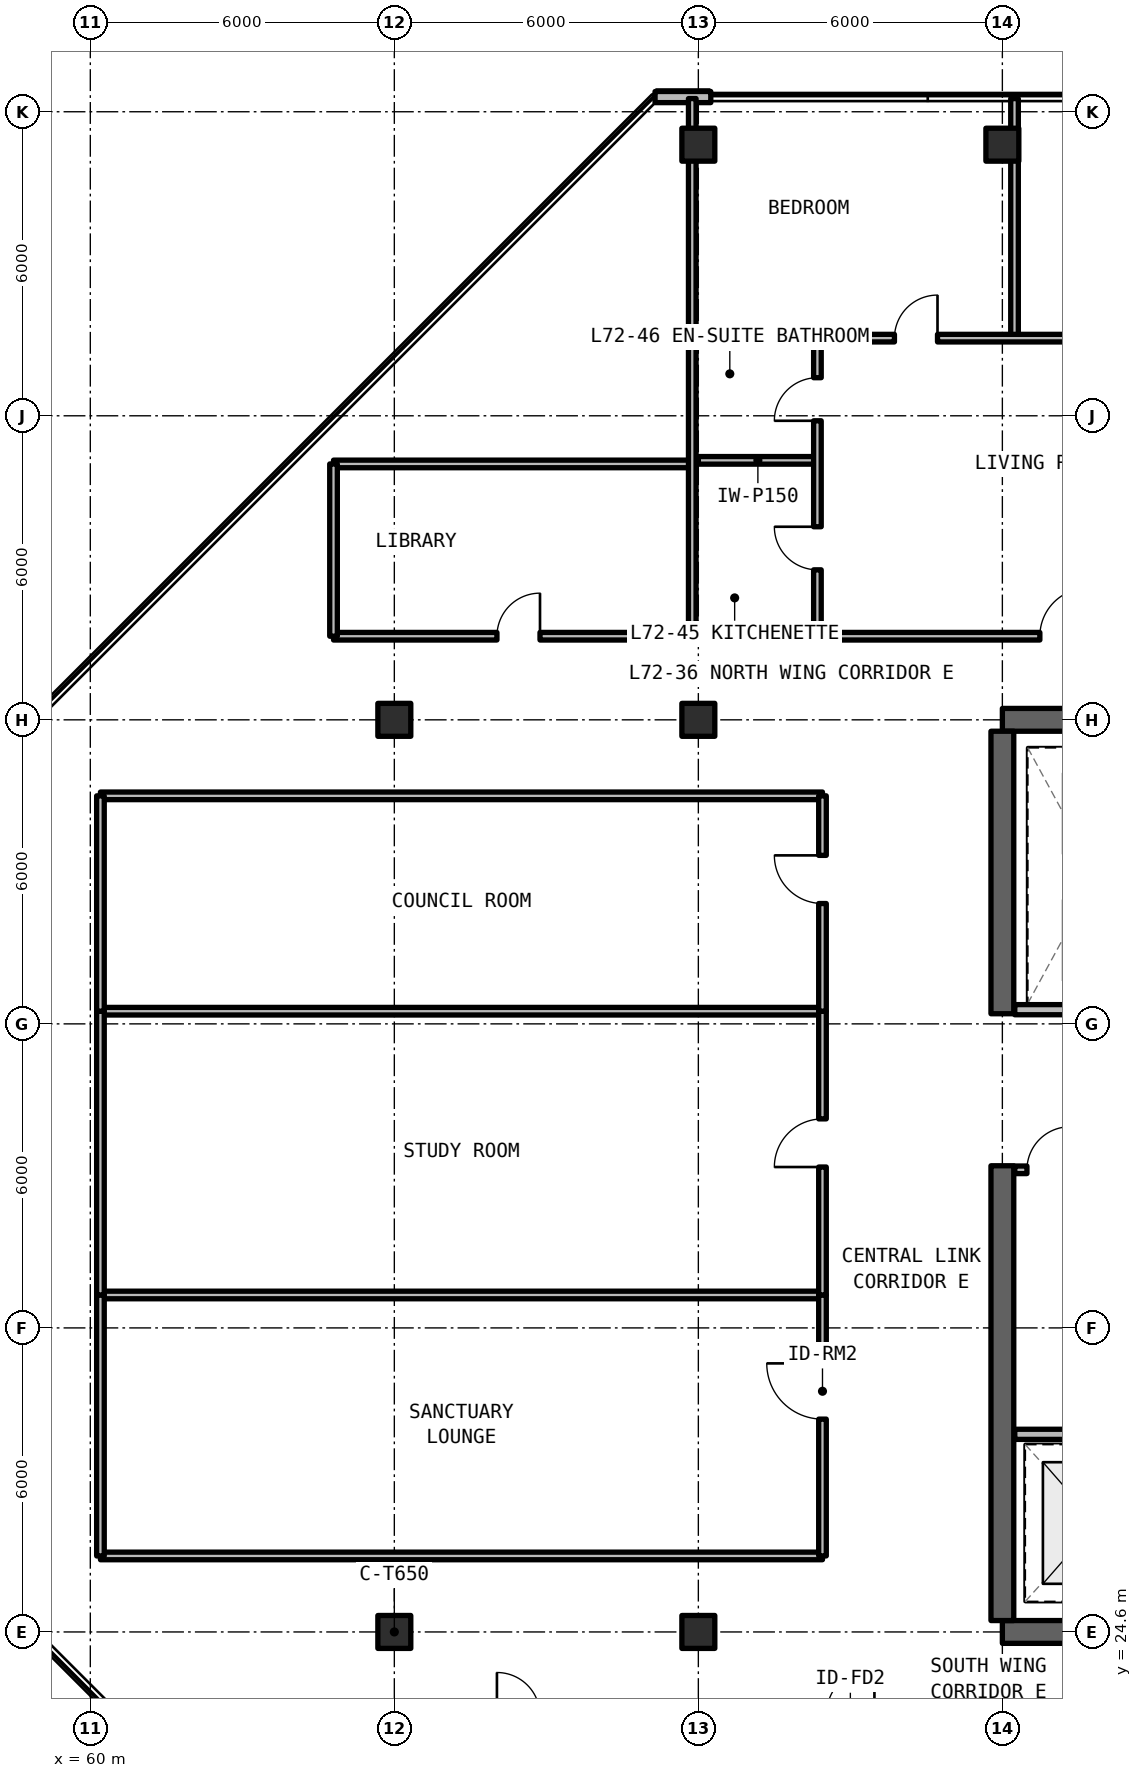
"""IFC4 building model, lengths in metres.
Left out: names, types, materials, properties, quantities, classifications, styles, units other than length and angle.
Written with IfcOpenShell. Run it as: python <this file> out.ifc"""

import sys

from ifc_helpers import new_model, si_unit, direction, frame, frame_2d, origin, origin_2d, place, context, subcontext, project, spatial, rectangle, extrude, element, fill, save


model = new_model("IFC4")
c1 = context("Model", 3, precision=1e-05, world=origin(), true_north=direction((0.0, 1.0)))
c2 = subcontext(c1, "Body", "Model", "MODEL_VIEW")
j1 = project(units=[si_unit("LENGTHUNIT", "METRE"), si_unit("PLANEANGLEUNIT", "RADIAN")], contexts=[c1])
p1 = place(None, origin())
s1 = spatial("IfcSite", under=j1, at=p1, CompositionType="ELEMENT")
p2 = place(p1, origin())
s2 = spatial("IfcBuilding", under=s1, at=p2, CompositionType="ELEMENT")
p3 = place(p2, frame((0.0, 0.0, 257.07)))
s3 = spatial("IfcBuildingStorey", under=s2, at=p3, CompositionType="ELEMENT", Elevation=257.07)
for number, where, z_axis, x_axis in (
    (1, (78.0, 24.6, 0.0), (0.0, 0.0, 1.0), (1.0, 0.0, 0.0)),
    (2, (90.0, 42.6, 0.0), (0.0, 0.0, 1.0), (-1.0, 0.0, 0.0)),
):
    element("IfcWall", number, at=place(p3, frame(where, z_axis=z_axis, x_axis=x_axis)), inside=s3, PredefinedType="SHEAR", context=c2, shape_type="SweptSolid", body=[
        extrude(rectangle(XDim=12.0, YDim=0.45, at=frame_2d((6.0, 0.0))), origin(), (0.0, 0.0, 1.0), 3.63),
    ])
p4 = place(p3, frame((78.0, 24.825, 0.0), z_axis=(0.0, 0.0, 1.0), x_axis=(0.0, 1.0, 0.0)))
e3 = element("IfcWall", 3, at=p4, inside=s3, PredefinedType="SHEAR", context=c2, shape_type="SweptSolid", body=[
    extrude(rectangle(XDim=8.975, YDim=0.45, at=frame_2d((4.488, 0.0))), origin(), (0.0, 0.0, 1.0), 3.63),
])
p5 = place(p3, frame((78.0, 36.8, 0.0), z_axis=(0.0, 0.0, 1.0), x_axis=(0.0, 1.0, 0.0)))
e4 = element("IfcWall", 4, at=p5, inside=s3, PredefinedType="SHEAR", context=c2, shape_type="SweptSolid", body=[
    extrude(rectangle(XDim=5.575, YDim=0.45, at=frame_2d((2.788, 0.0))), origin(), (0.0, 0.0, 1.0), 3.63),
])
for number, where, z_axis, x_axis in (
    (5, (66.0, 24.6, 0.0), (0.0, 0.0, 1.0), (1.0, 0.0, 0.0)),
    (6, (66.0, 42.6, 0.0), (0.0, 0.0, 1.0), (1.0, 0.0, 0.0)),
    (7, (72.0, 24.6, 0.0), (0.0, 0.0, 1.0), (1.0, 0.0, 0.0)),
    (8, (72.0, 42.6, 0.0), (0.0, 0.0, 1.0), (1.0, 0.0, 0.0)),
    (9, (72.0, 53.95, 0.0), (0.0, 0.0, 1.0), (1.0, 0.0, 0.0)),
    (10, (78.0, 53.95, 0.0), (0.0, 0.0, 1.0), (1.0, 0.0, 0.0)),
):
    element("IfcColumn", number, at=place(p3, frame(where, z_axis=z_axis, x_axis=x_axis)), inside=s3, PredefinedType="COLUMN", context=c2, shape_type="SweptSolid", body=[
        extrude(rectangle(XDim=0.65, YDim=0.65, at=origin_2d()), origin(), (0.0, 0.0, 1.0), 3.63),
    ])
p6 = place(p3, frame((72.246, 54.89, 0.0), z_axis=(0.0, 0.0, 1.0), x_axis=(-1.0, 0.0, 0.0)))
e11 = element("IfcWall", 11, at=p6, inside=s3, PredefinedType="SOLIDWALL", context=c2, shape_type="SweptSolid", body=[
    extrude(rectangle(XDim=1.1, YDim=0.22, at=frame_2d((0.55, 0.0))), origin(), (0.0, 0.0, 1.0), 3.41),
])
p7 = place(p3, frame((78.245, 28.5, 0.0), z_axis=(0.0, 0.0, 1.0), x_axis=(1.0, 0.0, 0.0)))
e12 = element("IfcWall", 12, at=p7, inside=s3, PredefinedType="SOLIDWALL", context=c2, shape_type="SweptSolid", body=[
    extrude(rectangle(XDim=7.585, YDim=0.2, at=frame_2d((3.792, 0.0))), origin(), (0.0, 0.0, 1.0), 2.63),
])
p8 = place(p7, frame((3.555, 0.0, 0.0)))
e13 = element("IfcOpeningElement", 13, at=p8, cuts=e12, PredefinedType="OPENING", context=c2, shape_type="SweptSolid", body=[
    extrude(rectangle(XDim=1.0, YDim=2.15, at=frame_2d((0.5, 1.075))), frame((0.0, 0.11, 0.0), z_axis=(0.0, -1.0, 0.0), x_axis=(1.0, 0.0, 0.0)), (0.0, 0.0, 1.0), 0.22),
])
p9 = place(p3, frame((78.245, 33.72, 0.0), z_axis=(0.0, 0.0, 1.0), x_axis=(1.0, 0.0, 0.0)))
e14 = element("IfcWall", 14, at=p9, inside=s3, PredefinedType="SOLIDWALL", context=c2, shape_type="SweptSolid", body=[
    extrude(rectangle(XDim=1.395, YDim=0.15, at=frame_2d((0.697, 0.0))), origin(), (0.0, 0.0, 1.0), 2.63),
])
p10 = place(p9, frame((0.24, 0.0, 0.0)))
e15 = element("IfcOpeningElement", 15, at=p10, cuts=e14, PredefinedType="OPENING", context=c2, shape_type="SweptSolid", body=[
    extrude(rectangle(XDim=0.85, YDim=2.1, at=frame_2d((0.425, 1.05))), frame((0.0, 0.085, 0.0), z_axis=(0.0, -1.0, 0.0), x_axis=(1.0, 0.0, 0.0)), (0.0, 0.0, 1.0), 0.17),
])
p11 = place(p3, frame((78.245, 36.88, 0.0), z_axis=(0.0, 0.0, 1.0), x_axis=(1.0, 0.0, 0.0)))
e16 = element("IfcWall", 16, at=p11, inside=s3, PredefinedType="SOLIDWALL", context=c2, shape_type="SweptSolid", body=[
    extrude(rectangle(XDim=3.075, YDim=0.2, at=frame_2d((1.538, 0.0))), origin(), (0.0, 0.0, 1.0), 2.63),
])
p12 = place(p3, frame((64.8, 44.25, 0.0), z_axis=(0.0, 0.0, 1.0), x_axis=(1.0, 0.0, 0.0)))
e17 = element("IfcWall", 17, at=p12, inside=s3, PredefinedType="SOLIDWALL", context=c2, shape_type="SweptSolid", body=[
    extrude(rectangle(XDim=7.08, YDim=0.15, at=frame_2d((3.54, 0.0))), origin(), (0.0, 0.0, 1.0), 2.63),
])
p13 = place(p12, frame((3.225, 0.0, 0.0)))
e18 = element("IfcOpeningElement", 18, at=p13, cuts=e17, PredefinedType="OPENING", context=c2, shape_type="SweptSolid", body=[
    extrude(rectangle(XDim=0.85, YDim=2.1, at=frame_2d((0.425, 1.05))), frame((0.0, 0.085, 0.0), z_axis=(0.0, -1.0, 0.0), x_axis=(1.0, 0.0, 0.0)), (0.0, 0.0, 1.0), 0.17),
])
p14 = place(p3, frame((64.8, 47.65, 0.0), z_axis=(0.0, 0.0, 1.0), x_axis=(1.0, 0.0, 0.0)))
e19 = element("IfcWall", 19, at=p14, inside=s3, PredefinedType="SOLIDWALL", context=c2, shape_type="SweptSolid", body=[
    extrude(rectangle(XDim=7.08, YDim=0.15, at=frame_2d((3.54, 0.0))), origin(), (0.0, 0.0, 1.0), 2.63),
])
p15 = place(p3, frame((64.8, 44.25, 0.0), z_axis=(0.0, 0.0, 1.0), x_axis=(0.0, 1.0, 0.0)))
e20 = element("IfcWall", 20, at=p15, inside=s3, PredefinedType="SOLIDWALL", context=c2, shape_type="SweptSolid", body=[
    extrude(rectangle(XDim=3.4, YDim=0.15, at=frame_2d((1.7, 0.0))), origin(), (0.0, 0.0, 1.0), 2.63),
])
p16 = place(p3, frame((71.88, 44.25, 0.0), z_axis=(0.0, 0.0, 1.0), x_axis=(0.0, 1.0, 0.0)))
e21 = element("IfcWall", 21, at=p16, inside=s3, PredefinedType="SOLIDWALL", context=c2, shape_type="SweptSolid", body=[
    extrude(rectangle(XDim=10.61, YDim=0.15, at=frame_2d((5.305, 0.0))), origin(), (0.0, 0.0, 1.0), 2.63),
])
p17 = place(p3, frame((72.0, 47.721, 0.0), z_axis=(0.0, 0.0, 1.0), x_axis=(1.0, 0.0, 0.0)))
e22 = element("IfcWall", 22, at=p17, inside=s3, PredefinedType="PARTITIONING", context=c2, shape_type="SweptSolid", body=[
    extrude(rectangle(XDim=2.35, YDim=0.15, at=frame_2d((1.175, 0.0))), origin(), (0.0, 0.0, 1.0), 2.63),
])
p18 = place(p3, frame((74.35, 44.25, 0.0), z_axis=(0.0, 0.0, 1.0), x_axis=(0.0, 1.0, 0.0)))
e23 = element("IfcWall", 23, at=p18, inside=s3, PredefinedType="PARTITIONING", context=c2, shape_type="SweptSolid", body=[
    extrude(rectangle(XDim=5.882, YDim=0.15, at=frame_2d((2.941, 0.0))), origin(), (0.0, 0.0, 1.0), 2.63),
])
p19 = place(p18, frame((1.31, 0.0, 0.0)))
e24 = element("IfcOpeningElement", 24, at=p19, cuts=e23, PredefinedType="OPENING", context=c2, shape_type="SweptSolid", body=[
    extrude(rectangle(XDim=0.85, YDim=2.1, at=frame_2d((0.425, 1.05))), frame((0.0, 0.085, 0.0), z_axis=(0.0, -1.0, 0.0), x_axis=(1.0, 0.0, 0.0)), (0.0, 0.0, 1.0), 0.17),
])
p20 = place(p18, frame((4.251, 0.0, 0.0)))
e25 = element("IfcOpeningElement", 25, at=p20, cuts=e23, PredefinedType="OPENING", context=c2, shape_type="SweptSolid", body=[
    extrude(rectangle(XDim=0.85, YDim=2.1, at=frame_2d((0.425, 1.05))), frame((0.0, 0.085, 0.0), z_axis=(0.0, -1.0, 0.0), x_axis=(1.0, 0.0, 0.0)), (0.0, 0.0, 1.0), 0.17),
])
p21 = place(p3, frame((78.24, 50.132, 0.0), z_axis=(0.0, 0.0, 1.0), x_axis=(0.0, 1.0, 0.0)))
e26 = element("IfcWall", 26, at=p21, inside=s3, PredefinedType="PARTITIONING", context=c2, shape_type="SweptSolid", body=[
    extrude(rectangle(XDim=4.728, YDim=0.15, at=frame_2d((2.364, 0.0))), origin(), (0.0, 0.0, 1.0), 2.63),
])
p22 = place(p3, frame((72.0, 50.132, 0.0), z_axis=(0.0, 0.0, 1.0), x_axis=(1.0, 0.0, 0.0)))
e27 = element("IfcWall", 27, at=p22, inside=s3, PredefinedType="PARTITIONING", context=c2, shape_type="SweptSolid", body=[
    extrude(rectangle(XDim=12.0, YDim=0.15, at=frame_2d((6.0, 0.0))), origin(), (0.0, 0.0, 1.0), 2.63),
])
p23 = place(p22, frame((3.87, 0.0, 0.0)))
e28 = element("IfcOpeningElement", 28, at=p23, cuts=e27, PredefinedType="OPENING", context=c2, shape_type="SweptSolid", body=[
    extrude(rectangle(XDim=0.85, YDim=2.1, at=frame_2d((0.425, 1.05))), frame((0.0, 0.085, 0.0), z_axis=(0.0, -1.0, 0.0), x_axis=(1.0, 0.0, 0.0)), (0.0, 0.0, 1.0), 0.17),
])
p24 = place(p22, frame((8.695, 0.0, 0.0)))
e29 = element("IfcOpeningElement", 29, at=p24, cuts=e27, PredefinedType="OPENING", context=c2, shape_type="SweptSolid", body=[
    extrude(rectangle(XDim=0.85, YDim=2.1, at=frame_2d((0.425, 1.05))), frame((0.0, 0.085, 0.0), z_axis=(0.0, -1.0, 0.0), x_axis=(1.0, 0.0, 0.0)), (0.0, 0.0, 1.0), 0.17),
])
p25 = place(p3, frame((72.0, 44.25, 0.0), z_axis=(0.0, 0.0, 1.0), x_axis=(1.0, 0.0, 0.0)))
e30 = element("IfcWall", 30, at=p25, inside=s3, PredefinedType="SOLIDWALL", context=c2, shape_type="SweptSolid", body=[
    extrude(rectangle(XDim=12.0, YDim=0.15, at=frame_2d((6.0, 0.0))), origin(), (0.0, 0.0, 1.0), 2.63),
])
p26 = place(p25, frame((6.74, 0.0, 0.0)))
e31 = element("IfcOpeningElement", 31, at=p26, cuts=e30, PredefinedType="OPENING", context=c2, shape_type="SweptSolid", body=[
    extrude(rectangle(XDim=0.95, YDim=2.15, at=frame_2d((0.475, 1.075))), frame((0.0, 0.085, 0.0), z_axis=(0.0, -1.0, 0.0), x_axis=(1.0, 0.0, 0.0)), (0.0, 0.0, 1.0), 0.17),
])
for number, where, z_axis, x_axis in (
    (32, (60.2, 26.1, 0.0), (0.0, 0.0, 1.0), (1.0, 0.0, 0.0)),
    (33, (60.2, 31.25, 0.0), (0.0, 0.0, 1.0), (1.0, 0.0, 0.0)),
):
    element("IfcWall", number, at=place(p3, frame(where, z_axis=z_axis, x_axis=x_axis)), inside=s3, PredefinedType="SOLIDWALL", context=c2, shape_type="SweptSolid", body=[
        extrude(rectangle(XDim=14.25, YDim=0.15, at=frame_2d((7.125, 0.0))), origin(), (0.0, 0.0, 1.0), 2.63),
    ])
p27 = place(p3, frame((60.2, 26.1, 0.0), z_axis=(0.0, 0.0, 1.0), x_axis=(0.0, 1.0, 0.0)))
e34 = element("IfcWall", 34, at=p27, inside=s3, PredefinedType="SOLIDWALL", context=c2, shape_type="SweptSolid", body=[
    extrude(rectangle(XDim=5.15, YDim=0.15, at=frame_2d((2.575, 0.0))), origin(), (0.0, 0.0, 1.0), 2.63),
])
p28 = place(p3, frame((74.45, 26.1, 0.0), z_axis=(0.0, 0.0, 1.0), x_axis=(0.0, 1.0, 0.0)))
e35 = element("IfcWall", 35, at=p28, inside=s3, PredefinedType="SOLIDWALL", context=c2, shape_type="SweptSolid", body=[
    extrude(rectangle(XDim=5.15, YDim=0.15, at=frame_2d((2.575, 0.0))), origin(), (0.0, 0.0, 1.0), 2.63),
])
p29 = place(p28, frame((2.7, 0.0, 0.0)))
e36 = element("IfcOpeningElement", 36, at=p29, cuts=e35, PredefinedType="OPENING", context=c2, shape_type="SweptSolid", body=[
    extrude(rectangle(XDim=1.1, YDim=2.15, at=frame_2d((0.55, 1.075))), frame((0.0, 0.085, 0.0), z_axis=(0.0, -1.0, 0.0), x_axis=(1.0, 0.0, 0.0)), (0.0, 0.0, 1.0), 0.17),
])
p30 = place(p3, frame((60.2, 36.85, 0.0), z_axis=(0.0, 0.0, 1.0), x_axis=(1.0, 0.0, 0.0)))
e37 = element("IfcWall", 37, at=p30, inside=s3, PredefinedType="SOLIDWALL", context=c2, shape_type="SweptSolid", body=[
    extrude(rectangle(XDim=14.25, YDim=0.15, at=frame_2d((7.125, 0.0))), origin(), (0.0, 0.0, 1.0), 2.63),
])
p31 = place(p3, frame((60.2, 31.25, 0.0), z_axis=(0.0, 0.0, 1.0), x_axis=(0.0, 1.0, 0.0)))
e38 = element("IfcWall", 38, at=p31, inside=s3, PredefinedType="SOLIDWALL", context=c2, shape_type="SweptSolid", body=[
    extrude(rectangle(XDim=5.6, YDim=0.15, at=frame_2d((2.8, 0.0))), origin(), (0.0, 0.0, 1.0), 2.63),
])
p32 = place(p3, frame((74.45, 31.25, 0.0), z_axis=(0.0, 0.0, 1.0), x_axis=(0.0, 1.0, 0.0)))
e39 = element("IfcWall", 39, at=p32, inside=s3, PredefinedType="SOLIDWALL", context=c2, shape_type="SweptSolid", body=[
    extrude(rectangle(XDim=5.6, YDim=0.15, at=frame_2d((2.8, 0.0))), origin(), (0.0, 0.0, 1.0), 2.63),
])
p33 = place(p32, frame((2.525, 0.0, 0.0)))
e40 = element("IfcOpeningElement", 40, at=p33, cuts=e39, PredefinedType="OPENING", context=c2, shape_type="SweptSolid", body=[
    extrude(rectangle(XDim=0.95, YDim=2.15, at=frame_2d((0.475, 1.075))), frame((0.0, 0.085, 0.0), z_axis=(0.0, -1.0, 0.0), x_axis=(1.0, 0.0, 0.0)), (0.0, 0.0, 1.0), 0.17),
])
p34 = place(p3, frame((60.2, 41.1, 0.0), z_axis=(0.0, 0.0, 1.0), x_axis=(1.0, 0.0, 0.0)))
e41 = element("IfcWall", 41, at=p34, inside=s3, PredefinedType="SOLIDWALL", context=c2, shape_type="SweptSolid", body=[
    extrude(rectangle(XDim=14.25, YDim=0.15, at=frame_2d((7.125, 0.0))), origin(), (0.0, 0.0, 1.0), 2.63),
])
p35 = place(p3, frame((60.2, 36.85, 0.0), z_axis=(0.0, 0.0, 1.0), x_axis=(0.0, 1.0, 0.0)))
e42 = element("IfcWall", 42, at=p35, inside=s3, PredefinedType="SOLIDWALL", context=c2, shape_type="SweptSolid", body=[
    extrude(rectangle(XDim=4.25, YDim=0.15, at=frame_2d((2.125, 0.0))), origin(), (0.0, 0.0, 1.0), 2.63),
])
p36 = place(p3, frame((74.45, 36.85, 0.0), z_axis=(0.0, 0.0, 1.0), x_axis=(0.0, 1.0, 0.0)))
e43 = element("IfcWall", 43, at=p36, inside=s3, PredefinedType="SOLIDWALL", context=c2, shape_type="SweptSolid", body=[
    extrude(rectangle(XDim=4.25, YDim=0.15, at=frame_2d((2.125, 0.0))), origin(), (0.0, 0.0, 1.0), 2.63),
])
p37 = place(p36, frame((2.125, 0.0, 0.0)))
e44 = element("IfcOpeningElement", 44, at=p37, cuts=e43, PredefinedType="OPENING", context=c2, shape_type="SweptSolid", body=[
    extrude(rectangle(XDim=0.95, YDim=2.15, at=frame_2d((0.475, 1.075))), frame((0.0, 0.085, 0.0), z_axis=(0.0, -1.0, 0.0), x_axis=(1.0, 0.0, 0.0)), (0.0, 0.0, 1.0), 0.17),
])
p38 = place(p10, origin())
e45 = element("IfcDoor", 45, at=p38, inside=s3, OperationType="SINGLE_SWING_RIGHT", PredefinedType="DOOR", context=c2, shape_type="SweptSolid", body=[
    extrude(rectangle(XDim=0.85, YDim=2.1, at=frame_2d((0.425, 1.05))), frame((0.0, 0.025, 0.0), z_axis=(0.0, -1.0, 0.0), x_axis=(1.0, 0.0, 0.0)), (0.0, 0.0, 1.0), 0.05),
])
fill(e15, e45)
p39 = place(p13, origin())
e46 = element("IfcDoor", 46, at=p39, inside=s3, OperationType="SINGLE_SWING_RIGHT", PredefinedType="DOOR", context=c2, shape_type="SweptSolid", body=[
    extrude(rectangle(XDim=0.85, YDim=2.1, at=frame_2d((0.425, 1.05))), frame((0.0, 0.025, 0.0), z_axis=(0.0, -1.0, 0.0), x_axis=(1.0, 0.0, 0.0)), (0.0, 0.0, 1.0), 0.05),
])
fill(e18, e46)
p40 = place(p19, origin())
e47 = element("IfcDoor", 47, at=p40, inside=s3, OperationType="SINGLE_SWING_RIGHT", PredefinedType="DOOR", context=c2, shape_type="SweptSolid", body=[
    extrude(rectangle(XDim=0.85, YDim=2.1, at=frame_2d((0.425, 1.05))), frame((0.0, 0.025, 0.0), z_axis=(0.0, -1.0, 0.0), x_axis=(1.0, 0.0, 0.0)), (0.0, 0.0, 1.0), 0.05),
])
fill(e24, e47)
p41 = place(p20, origin())
e48 = element("IfcDoor", 48, at=p41, inside=s3, OperationType="SINGLE_SWING_LEFT", PredefinedType="DOOR", context=c2, shape_type="SweptSolid", body=[
    extrude(rectangle(XDim=0.85, YDim=2.1, at=frame_2d((0.425, 1.05))), frame((0.0, 0.025, 0.0), z_axis=(0.0, -1.0, 0.0), x_axis=(1.0, 0.0, 0.0)), (0.0, 0.0, 1.0), 0.05),
])
fill(e25, e48)
p42 = place(p23, origin())
e49 = element("IfcDoor", 49, at=p42, inside=s3, OperationType="SINGLE_SWING_RIGHT", PredefinedType="DOOR", context=c2, shape_type="SweptSolid", body=[
    extrude(rectangle(XDim=0.85, YDim=2.1, at=frame_2d((0.425, 1.05))), frame((0.0, 0.025, 0.0), z_axis=(0.0, -1.0, 0.0), x_axis=(1.0, 0.0, 0.0)), (0.0, 0.0, 1.0), 0.05),
])
fill(e28, e49)
p43 = place(p26, origin())
e50 = element("IfcDoor", 50, at=p43, inside=s3, OperationType="SINGLE_SWING_RIGHT", PredefinedType="DOOR", context=c2, shape_type="SweptSolid", body=[
    extrude(rectangle(XDim=0.95, YDim=2.15, at=frame_2d((0.475, 1.075))), frame((0.0, 0.025, 0.0), z_axis=(0.0, -1.0, 0.0), x_axis=(1.0, 0.0, 0.0)), (0.0, 0.0, 1.0), 0.05),
])
fill(e31, e50)
p44 = place(p29, origin())
e51 = element("IfcDoor", 51, at=p44, inside=s3, OperationType="SINGLE_SWING_RIGHT", PredefinedType="DOOR", context=c2, shape_type="SweptSolid", body=[
    extrude(rectangle(XDim=1.1, YDim=2.15, at=frame_2d((0.55, 1.075))), frame((0.0, 0.025, 0.0), z_axis=(0.0, -1.0, 0.0), x_axis=(1.0, 0.0, 0.0)), (0.0, 0.0, 1.0), 0.05),
])
fill(e36, e51)
p45 = place(p33, origin())
e52 = element("IfcDoor", 52, at=p45, inside=s3, OperationType="SINGLE_SWING_LEFT", PredefinedType="DOOR", context=c2, shape_type="SweptSolid", body=[
    extrude(rectangle(XDim=0.95, YDim=2.15, at=frame_2d((0.475, 1.075))), frame((0.0, 0.025, 0.0), z_axis=(0.0, -1.0, 0.0), x_axis=(1.0, 0.0, 0.0)), (0.0, 0.0, 1.0), 0.05),
])
fill(e40, e52)
p46 = place(p37, origin())
e53 = element("IfcDoor", 53, at=p46, inside=s3, OperationType="SINGLE_SWING_RIGHT", PredefinedType="DOOR", context=c2, shape_type="SweptSolid", body=[
    extrude(rectangle(XDim=0.95, YDim=2.15, at=frame_2d((0.475, 1.075))), frame((0.0, 0.025, 0.0), z_axis=(0.0, -1.0, 0.0), x_axis=(1.0, 0.0, 0.0)), (0.0, 0.0, 1.0), 0.05),
])
fill(e44, e53)
save(model, sys.argv[1])
